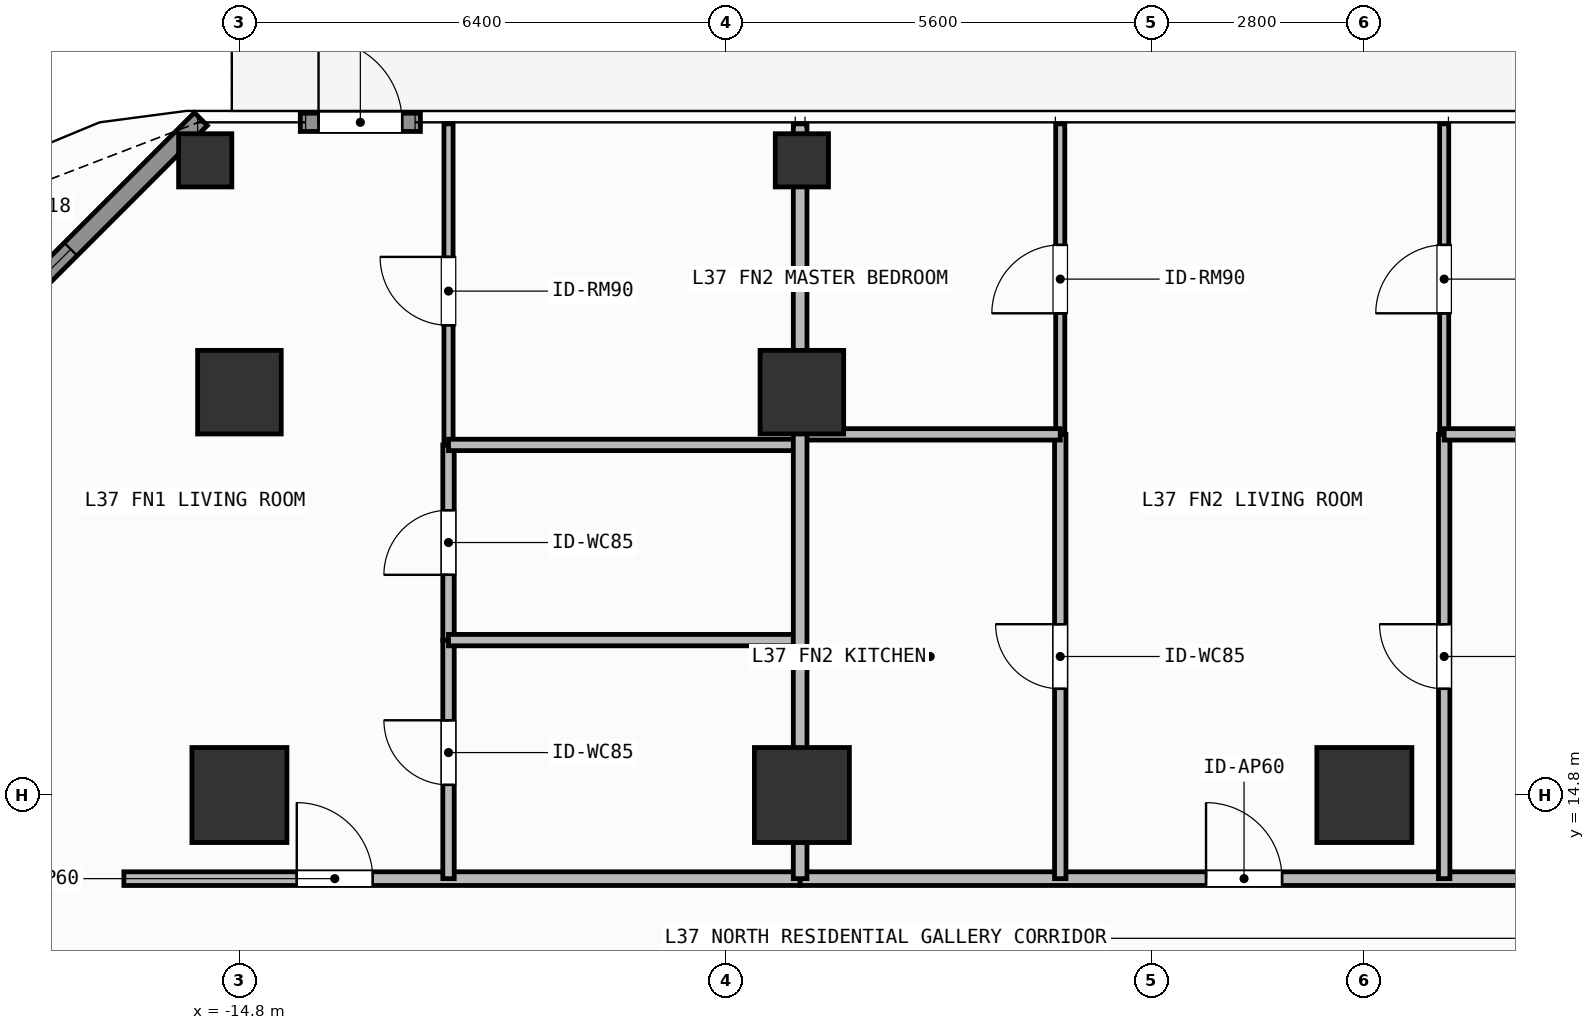
"""IFC4 building model, lengths in metres.
Left out: names, types, materials, properties, quantities, classifications, styles, units other than length and angle.
Written with IfcOpenShell. Run it as: python <this file> out.ifc"""

import sys

from ifc_helpers import new_model, si_unit, direction, frame, frame_2d, origin, origin_2d, place, context, subcontext, project, spatial, rectangle, hollow_rectangle, extrude, element, fill, save


model = new_model("IFC4")
c1 = context("Model", 3, precision=1e-05, world=origin(), true_north=direction((0.0, 1.0)))
c2 = subcontext(c1, "Body", "Model", "MODEL_VIEW")
j1 = project(units=[si_unit("LENGTHUNIT", "METRE"), si_unit("PLANEANGLEUNIT", "RADIAN")], contexts=[c1])
p1 = place(None, origin())
s1 = spatial("IfcSite", under=j1, at=p1, CompositionType="ELEMENT")
p2 = place(p1, origin())
s2 = spatial("IfcBuilding", under=s1, at=p2, CompositionType="ELEMENT")
p3 = place(p2, frame((0.0, 0.0, 148.5)))
s3 = spatial("IfcBuildingStorey", under=s2, at=p3, CompositionType="ELEMENT", Elevation=148.5)
for number, where, z_axis, x_axis in (
    (1, (-14.8, 14.8, 0.0), (0.0, 0.0, 1.0), (1.0, 0.0, 0.0)),
    (2, (-7.4, 14.8, 0.0), (0.0, 0.0, 1.0), (1.0, 0.0, 0.0)),
    (3, (0.0, 14.8, 0.0), (0.0, 0.0, 1.0), (1.0, 0.0, 0.0)),
):
    element("IfcColumn", number, at=place(p3, frame(where, z_axis=z_axis, x_axis=x_axis)), inside=s3, PredefinedType="COLUMN", context=c2, shape_type="SweptSolid", body=[
        extrude(rectangle(XDim=1.25, YDim=1.25, at=origin_2d()), origin(), (0.0, 0.0, 1.0), 3.9),
    ])
for number, where, z_axis, x_axis in (
    (4, (-14.8, 20.1, 0.0), (0.0, 0.0, 1.0), (1.0, 0.0, 0.0)),
    (5, (-7.4, 20.1, 0.0), (0.0, 0.0, 1.0), (1.0, 0.0, 0.0)),
):
    element("IfcColumn", number, at=place(p3, frame(where, z_axis=z_axis, x_axis=x_axis)), inside=s3, PredefinedType="COLUMN", context=c2, shape_type="SweptSolid", body=[
        extrude(rectangle(XDim=1.1, YDim=1.1, at=origin_2d()), origin(), (0.0, 0.0, 1.0), 3.9),
    ])
for number, where, z_axis, x_axis in (
    (6, (-15.25, 23.15, 0.0), (0.0, 0.0, 1.0), (1.0, 0.0, 0.0)),
    (7, (-7.4, 23.15, 0.0), (0.0, 0.0, 1.0), (1.0, 0.0, 0.0)),
):
    element("IfcColumn", number, at=place(p3, frame(where, z_axis=z_axis, x_axis=x_axis)), inside=s3, PredefinedType="COLUMN", context=c2, shape_type="SweptSolid", body=[
        extrude(hollow_rectangle(XDim=0.7, YDim=0.7, WallThickness=0.032, at=origin_2d()), origin(), (0.0, 0.0, 1.0), 3.9),
    ])
p4 = place(p3, frame((-13.999, 23.65, 0.0), z_axis=(0.0, 0.0, 1.0), x_axis=(1.0, 0.0, 0.0)))
e8 = element("IfcWall", 8, at=p4, inside=s3, PredefinedType="SOLIDWALL", context=c2, shape_type="SweptSolid", body=[
    extrude(rectangle(XDim=1.58, YDim=0.24, at=frame_2d((0.79, 0.0))), origin(), (0.0, 0.0, 1.0), 3.68),
])
p5 = place(p4, frame((0.24, 0.0, 0.0)))
e9 = element("IfcOpeningElement", 9, at=p5, cuts=e8, PredefinedType="OPENING", context=c2, shape_type="SweptSolid", body=[
    extrude(rectangle(XDim=1.1, YDim=2.2, at=frame_2d((0.55, 1.1))), frame((0.0, 0.13, 0.0), z_axis=(0.0, -1.0, 0.0), x_axis=(1.0, 0.0, 0.0)), (0.0, 0.0, 1.0), 0.26),
])
p6 = place(p3, frame((-19.792, 19.208, 0.0), z_axis=(0.0, 0.0, 1.0), x_axis=(0.707106781187, 0.707106781187, 0.0)))
e10 = element("IfcWall", 10, at=p6, inside=s3, PredefinedType="SOLIDWALL", context=c2, shape_type="SweptSolid", body=[
    extrude(rectangle(XDim=6.343, YDim=0.24, at=frame_2d((3.171, 0.0))), origin(), (0.0, 0.0, 1.0), 3.68),
])
p7 = place(p6, frame((2.421, 0.0, 0.8)))
e11 = element("IfcOpeningElement", 11, at=p7, cuts=e10, PredefinedType="OPENING", context=c2, shape_type="SweptSolid", body=[
    extrude(rectangle(XDim=1.5, YDim=1.85, at=frame_2d((0.75, 0.925))), frame((0.0, 0.13, 0.0), z_axis=(0.0, -1.0, 0.0), x_axis=(1.0, 0.0, 0.0)), (0.0, 0.0, 1.0), 0.26),
])
p8 = place(p3, frame((-16.32, 13.7, 0.0), z_axis=(0.0, 0.0, 1.0), x_axis=(1.0, 0.0, 0.0)))
e12 = element("IfcWall", 12, at=p8, inside=s3, PredefinedType="PARTITIONING", context=c2, shape_type="SweptSolid", body=[
    extrude(rectangle(XDim=8.897, YDim=0.18, at=frame_2d((4.448, 0.0))), origin(), (0.0, 0.0, 1.0), 3.68),
])
p9 = place(p8, frame((2.274, 0.0, 0.0)))
e13 = element("IfcOpeningElement", 13, at=p9, cuts=e12, PredefinedType="OPENING", context=c2, shape_type="SweptSolid", body=[
    extrude(rectangle(XDim=1.0, YDim=2.2, at=frame_2d((0.5, 1.1))), frame((0.0, 0.1, 0.0), z_axis=(0.0, -1.0, 0.0), x_axis=(1.0, 0.0, 0.0)), (0.0, 0.0, 1.0), 0.2),
])
p10 = place(p3, frame((-12.049, 13.7, 0.0), z_axis=(0.0, 0.0, 1.0), x_axis=(0.0, 1.0, 0.0)))
e14 = element("IfcWall", 14, at=p10, inside=s3, PredefinedType="PARTITIONING", context=c2, shape_type="SweptSolid", body=[
    extrude(rectangle(XDim=3.138, YDim=0.15, at=frame_2d((1.569, 0.0))), origin(), (0.0, 0.0, 1.0), 3.68),
])
p11 = place(p10, frame((1.233, 0.0, 0.0)))
e15 = element("IfcOpeningElement", 15, at=p11, cuts=e14, PredefinedType="OPENING", context=c2, shape_type="SweptSolid", body=[
    extrude(rectangle(XDim=0.85, YDim=2.1, at=frame_2d((0.425, 1.05))), frame((0.0, 0.085, 0.0), z_axis=(0.0, -1.0, 0.0), x_axis=(1.0, 0.0, 0.0)), (0.0, 0.0, 1.0), 0.17),
])
p12 = place(p3, frame((-12.049, 16.838, 0.0), z_axis=(0.0, 0.0, 1.0), x_axis=(0.0, 1.0, 0.0)))
e16 = element("IfcWall", 16, at=p12, inside=s3, PredefinedType="PARTITIONING", context=c2, shape_type="SweptSolid", body=[
    extrude(rectangle(XDim=2.568, YDim=0.15, at=frame_2d((1.284, 0.0))), origin(), (0.0, 0.0, 1.0), 3.68),
])
p13 = place(p12, frame((0.859, 0.0, 0.0)))
e17 = element("IfcOpeningElement", 17, at=p13, cuts=e16, PredefinedType="OPENING", context=c2, shape_type="SweptSolid", body=[
    extrude(rectangle(XDim=0.85, YDim=2.1, at=frame_2d((0.425, 1.05))), frame((0.0, 0.085, 0.0), z_axis=(0.0, -1.0, 0.0), x_axis=(1.0, 0.0, 0.0)), (0.0, 0.0, 1.0), 0.17),
])
p14 = place(p3, frame((-12.049, 19.406, 0.0), z_axis=(0.0, 0.0, 1.0), x_axis=(0.0, 1.0, 0.0)))
e18 = element("IfcWall", 18, at=p14, inside=s3, PredefinedType="PARTITIONING", context=c2, shape_type="SweptSolid", body=[
    extrude(rectangle(XDim=4.224, YDim=0.12, at=frame_2d((2.112, 0.0))), origin(), (0.0, 0.0, 1.0), 3.68),
])
p15 = place(p14, frame((1.573, 0.0, 0.0)))
e19 = element("IfcOpeningElement", 19, at=p15, cuts=e18, PredefinedType="OPENING", context=c2, shape_type="SweptSolid", body=[
    extrude(rectangle(XDim=0.9, YDim=2.1, at=frame_2d((0.45, 1.05))), frame((0.0, 0.07, 0.0), z_axis=(0.0, -1.0, 0.0), x_axis=(1.0, 0.0, 0.0)), (0.0, 0.0, 1.0), 0.14),
])
p16 = place(p3, frame((-7.423, 13.7, 0.0), z_axis=(0.0, 0.0, 1.0), x_axis=(1.0, 0.0, 0.0)))
e20 = element("IfcWall", 20, at=p16, inside=s3, PredefinedType="PARTITIONING", context=c2, shape_type="SweptSolid", body=[
    extrude(rectangle(XDim=11.323, YDim=0.18, at=frame_2d((5.662, 0.0))), origin(), (0.0, 0.0, 1.0), 3.68),
])
p17 = place(p16, frame((5.34, 0.0, 0.0)))
e21 = element("IfcOpeningElement", 21, at=p17, cuts=e20, PredefinedType="OPENING", context=c2, shape_type="SweptSolid", body=[
    extrude(rectangle(XDim=1.0, YDim=2.2, at=frame_2d((0.5, 1.1))), frame((0.0, 0.1, 0.0), z_axis=(0.0, -1.0, 0.0), x_axis=(1.0, 0.0, 0.0)), (0.0, 0.0, 1.0), 0.2),
])
p18 = place(p3, frame((-4.001, 13.7, 0.0), z_axis=(0.0, 0.0, 1.0), x_axis=(0.0, 1.0, 0.0)))
e22 = element("IfcWall", 22, at=p18, inside=s3, PredefinedType="PARTITIONING", context=c2, shape_type="SweptSolid", body=[
    extrude(rectangle(XDim=5.845, YDim=0.15, at=frame_2d((2.922, 0.0))), origin(), (0.0, 0.0, 1.0), 3.68),
])
p19 = place(p18, frame((2.498, 0.0, 0.0)))
e23 = element("IfcOpeningElement", 23, at=p19, cuts=e22, PredefinedType="OPENING", context=c2, shape_type="SweptSolid", body=[
    extrude(rectangle(XDim=0.85, YDim=2.1, at=frame_2d((0.425, 1.05))), frame((0.0, 0.085, 0.0), z_axis=(0.0, -1.0, 0.0), x_axis=(1.0, 0.0, 0.0)), (0.0, 0.0, 1.0), 0.17),
])
p20 = place(p3, frame((-4.001, 19.545, 0.0), z_axis=(0.0, 0.0, 1.0), x_axis=(0.0, 1.0, 0.0)))
e24 = element("IfcWall", 24, at=p20, inside=s3, PredefinedType="PARTITIONING", context=c2, shape_type="SweptSolid", body=[
    extrude(rectangle(XDim=4.085, YDim=0.12, at=frame_2d((2.042, 0.0))), origin(), (0.0, 0.0, 1.0), 3.68),
])
p21 = place(p20, frame((1.593, 0.0, 0.0)))
e25 = element("IfcOpeningElement", 25, at=p21, cuts=e24, PredefinedType="OPENING", context=c2, shape_type="SweptSolid", body=[
    extrude(rectangle(XDim=0.9, YDim=2.1, at=frame_2d((0.45, 1.05))), frame((0.0, 0.07, 0.0), z_axis=(0.0, -1.0, 0.0), x_axis=(1.0, 0.0, 0.0)), (0.0, 0.0, 1.0), 0.14),
])
p22 = place(p3, frame((1.05, 13.7, 0.0), z_axis=(0.0, 0.0, 1.0), x_axis=(0.0, 1.0, 0.0)))
e26 = element("IfcWall", 26, at=p22, inside=s3, PredefinedType="PARTITIONING", context=c2, shape_type="SweptSolid", body=[
    extrude(rectangle(XDim=5.845, YDim=0.15, at=frame_2d((2.922, 0.0))), origin(), (0.0, 0.0, 1.0), 3.68),
])
p23 = place(p22, frame((2.498, 0.0, 0.0)))
e27 = element("IfcOpeningElement", 27, at=p23, cuts=e26, PredefinedType="OPENING", context=c2, shape_type="SweptSolid", body=[
    extrude(rectangle(XDim=0.85, YDim=2.1, at=frame_2d((0.425, 1.05))), frame((0.0, 0.085, 0.0), z_axis=(0.0, -1.0, 0.0), x_axis=(1.0, 0.0, 0.0)), (0.0, 0.0, 1.0), 0.17),
])
p24 = place(p3, frame((1.05, 19.545, 0.0), z_axis=(0.0, 0.0, 1.0), x_axis=(0.0, 1.0, 0.0)))
e28 = element("IfcWall", 28, at=p24, inside=s3, PredefinedType="PARTITIONING", context=c2, shape_type="SweptSolid", body=[
    extrude(rectangle(XDim=4.085, YDim=0.12, at=frame_2d((2.042, 0.0))), origin(), (0.0, 0.0, 1.0), 3.68),
])
p25 = place(p24, frame((1.593, 0.0, 0.0)))
e29 = element("IfcOpeningElement", 29, at=p25, cuts=e28, PredefinedType="OPENING", context=c2, shape_type="SweptSolid", body=[
    extrude(rectangle(XDim=0.9, YDim=2.1, at=frame_2d((0.45, 1.05))), frame((0.0, 0.07, 0.0), z_axis=(0.0, -1.0, 0.0), x_axis=(1.0, 0.0, 0.0)), (0.0, 0.0, 1.0), 0.14),
])
for number, where, z_axis, x_axis in (
    (30, (-12.049, 16.838, 0.0), (0.0, 0.0, 1.0), (1.0, 0.0, 0.0)),
    (31, (-12.049, 19.406, 0.0), (0.0, 0.0, 1.0), (1.0, 0.0, 0.0)),
):
    element("IfcWall", number, at=place(p3, frame(where, z_axis=z_axis, x_axis=x_axis)), inside=s3, PredefinedType="PARTITIONING", context=c2, shape_type="SweptSolid", body=[
        extrude(rectangle(XDim=4.626, YDim=0.15, at=frame_2d((2.313, 0.0))), origin(), (0.0, 0.0, 1.0), 3.68),
    ])
p26 = place(p3, frame((-7.423, 19.545, 0.0), z_axis=(0.0, 0.0, 1.0), x_axis=(1.0, 0.0, 0.0)))
e32 = element("IfcWall", 32, at=p26, inside=s3, PredefinedType="PARTITIONING", context=c2, shape_type="SweptSolid", body=[
    extrude(rectangle(XDim=3.422, YDim=0.15, at=frame_2d((1.711, 0.0))), origin(), (0.0, 0.0, 1.0), 3.68),
])
p27 = place(p3, frame((1.05, 19.545, 0.0), z_axis=(0.0, 0.0, 1.0), x_axis=(1.0, 0.0, 0.0)))
e33 = element("IfcWall", 33, at=p27, inside=s3, PredefinedType="PARTITIONING", context=c2, shape_type="SweptSolid", body=[
    extrude(rectangle(XDim=2.85, YDim=0.15, at=frame_2d((1.425, 0.0))), origin(), (0.0, 0.0, 1.0), 3.68),
])
p28 = place(p3, frame((-7.423, 13.7, 0.0), z_axis=(0.0, 0.0, 1.0), x_axis=(0.0, 1.0, 0.0)))
e34 = element("IfcWall", 34, at=p28, inside=s3, PredefinedType="PARTITIONING", context=c2, shape_type="SweptSolid", body=[
    extrude(rectangle(XDim=9.93, YDim=0.18, at=frame_2d((4.965, 0.0))), origin(), (0.0, 0.0, 1.0), 3.082),
])
p29 = place(p5, origin())
e35 = element("IfcDoor", 35, at=p29, inside=s3, OperationType="SINGLE_SWING_LEFT", PredefinedType="DOOR", context=c2, shape_type="SweptSolid", body=[
    extrude(rectangle(XDim=1.1, YDim=2.2, at=frame_2d((0.55, 1.1))), frame((0.0, 0.025, 0.0), z_axis=(0.0, -1.0, 0.0), x_axis=(1.0, 0.0, 0.0)), (0.0, 0.0, 1.0), 0.05),
])
fill(e9, e35)
p30 = place(p7, origin())
e36 = element("IfcWindow", 36, at=p30, inside=s3, PartitioningType="SINGLE_PANEL", PredefinedType="WINDOW", context=c2, shape_type="SweptSolid", body=[
    extrude(rectangle(XDim=1.5, YDim=1.85, at=frame_2d((0.75, 0.925))), frame((0.0, 0.03, 0.0), z_axis=(0.0, -1.0, 0.0), x_axis=(1.0, 0.0, 0.0)), (0.0, 0.0, 1.0), 0.06),
])
fill(e11, e36)
p31 = place(p9, origin())
e37 = element("IfcDoor", 37, at=p31, inside=s3, OperationType="SINGLE_SWING_LEFT", PredefinedType="DOOR", context=c2, shape_type="SweptSolid", body=[
    extrude(rectangle(XDim=1.0, YDim=2.2, at=frame_2d((0.5, 1.1))), frame((0.0, 0.025, 0.0), z_axis=(0.0, -1.0, 0.0), x_axis=(1.0, 0.0, 0.0)), (0.0, 0.0, 1.0), 0.05),
])
fill(e13, e37)
p32 = place(p11, origin())
e38 = element("IfcDoor", 38, at=p32, inside=s3, OperationType="SINGLE_SWING_RIGHT", PredefinedType="DOOR", context=c2, shape_type="SweptSolid", body=[
    extrude(rectangle(XDim=0.85, YDim=2.1, at=frame_2d((0.425, 1.05))), frame((0.0, 0.025, 0.0), z_axis=(0.0, -1.0, 0.0), x_axis=(1.0, 0.0, 0.0)), (0.0, 0.0, 1.0), 0.05),
])
fill(e15, e38)
p33 = place(p13, origin())
e39 = element("IfcDoor", 39, at=p33, inside=s3, OperationType="SINGLE_SWING_LEFT", PredefinedType="DOOR", context=c2, shape_type="SweptSolid", body=[
    extrude(rectangle(XDim=0.85, YDim=2.1, at=frame_2d((0.425, 1.05))), frame((0.0, 0.025, 0.0), z_axis=(0.0, -1.0, 0.0), x_axis=(1.0, 0.0, 0.0)), (0.0, 0.0, 1.0), 0.05),
])
fill(e17, e39)
p34 = place(p15, origin())
e40 = element("IfcDoor", 40, at=p34, inside=s3, OperationType="SINGLE_SWING_RIGHT", PredefinedType="DOOR", context=c2, shape_type="SweptSolid", body=[
    extrude(rectangle(XDim=0.9, YDim=2.1, at=frame_2d((0.45, 1.05))), frame((0.0, 0.025, 0.0), z_axis=(0.0, -1.0, 0.0), x_axis=(1.0, 0.0, 0.0)), (0.0, 0.0, 1.0), 0.05),
])
fill(e19, e40)
p35 = place(p17, origin())
e41 = element("IfcDoor", 41, at=p35, inside=s3, OperationType="SINGLE_SWING_LEFT", PredefinedType="DOOR", context=c2, shape_type="SweptSolid", body=[
    extrude(rectangle(XDim=1.0, YDim=2.2, at=frame_2d((0.5, 1.1))), frame((0.0, 0.025, 0.0), z_axis=(0.0, -1.0, 0.0), x_axis=(1.0, 0.0, 0.0)), (0.0, 0.0, 1.0), 0.05),
])
fill(e21, e41)
p36 = place(p19, origin())
e42 = element("IfcDoor", 42, at=p36, inside=s3, OperationType="SINGLE_SWING_RIGHT", PredefinedType="DOOR", context=c2, shape_type="SweptSolid", body=[
    extrude(rectangle(XDim=0.85, YDim=2.1, at=frame_2d((0.425, 1.05))), frame((0.0, 0.025, 0.0), z_axis=(0.0, -1.0, 0.0), x_axis=(1.0, 0.0, 0.0)), (0.0, 0.0, 1.0), 0.05),
])
fill(e23, e42)
p37 = place(p21, origin())
e43 = element("IfcDoor", 43, at=p37, inside=s3, OperationType="SINGLE_SWING_LEFT", PredefinedType="DOOR", context=c2, shape_type="SweptSolid", body=[
    extrude(rectangle(XDim=0.9, YDim=2.1, at=frame_2d((0.45, 1.05))), frame((0.0, 0.025, 0.0), z_axis=(0.0, -1.0, 0.0), x_axis=(1.0, 0.0, 0.0)), (0.0, 0.0, 1.0), 0.05),
])
fill(e25, e43)
p38 = place(p23, origin())
e44 = element("IfcDoor", 44, at=p38, inside=s3, OperationType="SINGLE_SWING_RIGHT", PredefinedType="DOOR", context=c2, shape_type="SweptSolid", body=[
    extrude(rectangle(XDim=0.85, YDim=2.1, at=frame_2d((0.425, 1.05))), frame((0.0, 0.025, 0.0), z_axis=(0.0, -1.0, 0.0), x_axis=(1.0, 0.0, 0.0)), (0.0, 0.0, 1.0), 0.05),
])
fill(e27, e44)
p39 = place(p25, origin())
e45 = element("IfcDoor", 45, at=p39, inside=s3, OperationType="SINGLE_SWING_LEFT", PredefinedType="DOOR", context=c2, shape_type="SweptSolid", body=[
    extrude(rectangle(XDim=0.9, YDim=2.1, at=frame_2d((0.45, 1.05))), frame((0.0, 0.025, 0.0), z_axis=(0.0, -1.0, 0.0), x_axis=(1.0, 0.0, 0.0)), (0.0, 0.0, 1.0), 0.05),
])
fill(e29, e45)
save(model, sys.argv[1])
